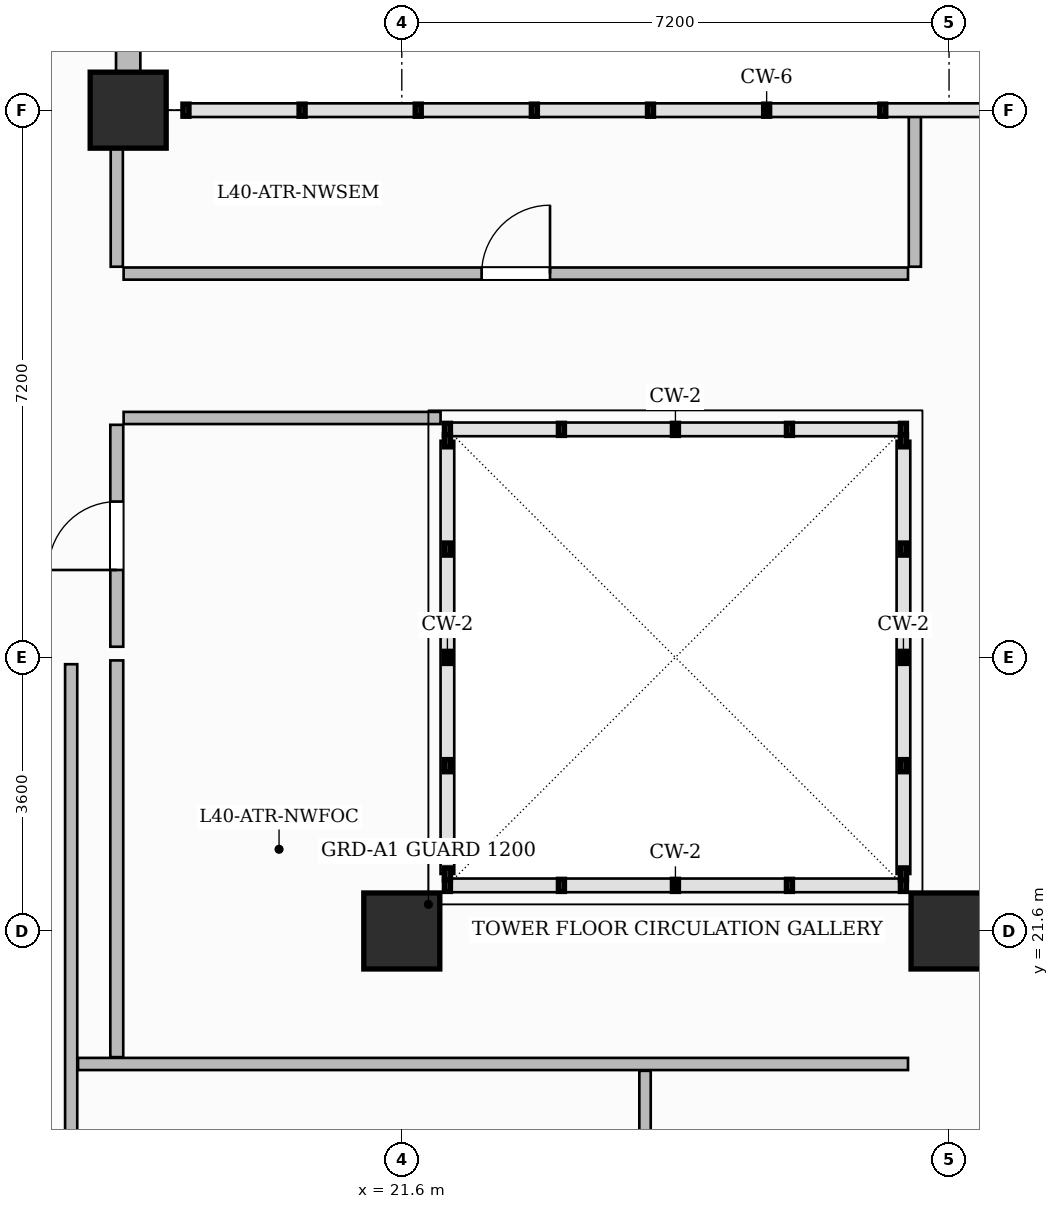
"""IFC4 building model, lengths in metres.
Left out: names, types, materials, properties, quantities, classifications, styles, units other than length and angle.
Written with IfcOpenShell. Run it as: python <this file> out.ifc"""

import sys

from ifc_helpers import new_model, si_unit, direction, frame, frame_2d, origin, origin_2d, place, context, subcontext, project, spatial, rectangle, extrude, source, transform, mapped, element, fill, save


model = new_model("IFC4")
c1 = context("Model", 3, precision=1e-05, world=origin(), true_north=direction((0.0, 1.0)))
c2 = subcontext(c1, "Body", "Model", "MODEL_VIEW")
j1 = project(units=[si_unit("LENGTHUNIT", "METRE"), si_unit("PLANEANGLEUNIT", "RADIAN")], contexts=[c1])
p1 = place(None, origin())
s1 = spatial("IfcSite", under=j1, at=p1, CompositionType="ELEMENT")
p2 = place(p1, origin())
s2 = spatial("IfcBuilding", under=s1, at=p2, CompositionType="ELEMENT")
p3 = place(p2, frame((0.0, 0.0, 161.85)))
s3 = spatial("IfcBuildingStorey", under=s2, at=p3, CompositionType="ELEMENT", Elevation=161.85)
m1 = source(origin(), c2, "Body", "SweptSolid", [
    extrude(rectangle(XDim=1.0, YDim=1.0, at=origin_2d()), origin(), (0.0, 0.0, 1.0), 3.85),
])
for number, where, z_axis, x_axis in (
    (1, (21.6, 21.6, 0.0), (0.0, 0.0, 1.0), (1.0, 0.0, 0.0)),
    (2, (28.8, 21.6, 0.0), (0.0, 0.0, 1.0), (1.0, 0.0, 0.0)),
    (3, (18.0, 32.4, 0.0), (0.0, 0.0, 1.0), (1.0, 0.0, 0.0)),
):
    element("IfcColumn", number, at=place(p3, frame(where, z_axis=z_axis, x_axis=x_axis)), inside=s3, PredefinedType="COLUMN", context=c2, shape_type="MappedRepresentation", body=[
        mapped(m1, transform((0.0, 0.0, 0.0), scale=1.0)),
    ])
p4 = place(p3, frame((17.25, 11.16, 0.0), z_axis=(0.0, 0.0, 1.0), x_axis=(0.0, 1.0, 0.0)))
e4 = element("IfcWall", 4, at=p4, inside=s3, PredefinedType="PARTITIONING", context=c2, shape_type="SweptSolid", body=[
    extrude(rectangle(XDim=13.95, YDim=0.16, at=frame_2d((6.975, 0.0))), origin(), (0.0, 0.0, 1.0), 3.6),
])
p5 = place(p3, frame((17.85, 19.94, 0.0), z_axis=(0.0, 0.0, 1.0), x_axis=(0.0, 1.0, 0.0)))
e5 = element("IfcWall", 5, at=p5, inside=s3, PredefinedType="PARTITIONING", context=c2, shape_type="SweptSolid", body=[
    extrude(rectangle(XDim=5.22, YDim=0.17, at=frame_2d((2.61, 0.0))), origin(), (0.0, 0.0, 1.0), 3.285),
])
p6 = place(p3, frame((17.85, 30.34, 0.0), z_axis=(0.0, 0.0, 1.0), x_axis=(0.0, 1.0, 0.0)))
e6 = element("IfcWall", 6, at=p6, inside=s3, PredefinedType="PARTITIONING", context=c2, shape_type="SweptSolid", body=[
    extrude(rectangle(XDim=1.87, YDim=0.16, at=frame_2d((0.935, 0.0))), origin(), (0.0, 0.0, 1.0), 3.6),
])
p7 = place(p3, frame((28.35, 30.34, 0.0), z_axis=(0.0, 0.0, 1.0), x_axis=(0.0, 1.0, 0.0)))
e7 = element("IfcWall", 7, at=p7, inside=s3, PredefinedType="PARTITIONING", context=c2, shape_type="SweptSolid", body=[
    extrude(rectangle(XDim=2.032, YDim=0.16, at=frame_2d((1.016, 0.0))), origin(), (0.0, 0.0, 1.0), 3.6),
])
p8 = place(p3, frame((17.94, 28.35, 0.0), z_axis=(0.0, 0.0, 1.0), x_axis=(1.0, 0.0, 0.0)))
e8 = element("IfcWall", 8, at=p8, inside=s3, PredefinedType="PARTITIONING", context=c2, shape_type="SweptSolid", body=[
    extrude(rectangle(XDim=4.17, YDim=0.16, at=frame_2d((2.085, 0.0))), origin(), (0.0, 0.0, 1.0), 3.6),
])
p9 = place(p3, frame((17.94, 30.25, 0.0), z_axis=(0.0, 0.0, 1.0), x_axis=(1.0, 0.0, 0.0)))
e9 = element("IfcWall", 9, at=p9, inside=s3, PredefinedType="PARTITIONING", context=c2, shape_type="SweptSolid", body=[
    extrude(rectangle(XDim=10.32, YDim=0.16, at=frame_2d((5.16, 0.0))), origin(), (0.0, 0.0, 1.0), 3.6),
])
p10 = place(p9, frame((4.71, 0.0, 0.0)))
e10 = element("IfcOpeningElement", 10, at=p10, cuts=e9, PredefinedType="OPENING", context=c2, shape_type="SweptSolid", body=[
    extrude(rectangle(XDim=0.9, YDim=2.15, at=frame_2d((0.45, 1.075))), frame((0.0, 0.09, 0.0), z_axis=(0.0, -1.0, 0.0), x_axis=(1.0, 0.0, 0.0)), (0.0, 0.0, 1.0), 0.18),
])
p11 = place(p3, frame((17.85, 25.34, 0.0), z_axis=(0.0, 0.0, 1.0), x_axis=(0.0, 1.0, 0.0)))
e11 = element("IfcWall", 11, at=p11, inside=s3, PredefinedType="PARTITIONING", context=c2, shape_type="SweptSolid", body=[
    extrude(rectangle(XDim=2.92, YDim=0.17, at=frame_2d((1.46, 0.0))), origin(), (0.0, 0.0, 1.0), 3.6),
])
p12 = place(p11, frame((1.01, 0.0, 0.0)))
e12 = element("IfcOpeningElement", 12, at=p12, cuts=e11, PredefinedType="OPENING", context=c2, shape_type="SweptSolid", body=[
    extrude(rectangle(XDim=0.9, YDim=2.15, at=frame_2d((0.45, 1.075))), frame((0.0, 0.095, 0.0), z_axis=(0.0, -1.0, 0.0), x_axis=(1.0, 0.0, 0.0)), (0.0, 0.0, 1.0), 0.19),
])
p13 = place(p3, frame((17.34, 19.85, 0.0), z_axis=(0.0, 0.0, 1.0), x_axis=(1.0, 0.0, 0.0)))
e13 = element("IfcWall", 13, at=p13, inside=s3, PredefinedType="PARTITIONING", context=c2, shape_type="SweptSolid", body=[
    extrude(rectangle(XDim=10.92, YDim=0.16, at=frame_2d((5.46, 0.0))), origin(), (0.0, 0.0, 1.0), 3.6),
])
p14 = place(p3, frame((24.8, 11.16, 0.0), z_axis=(0.0, 0.0, 1.0), x_axis=(0.0, 1.0, 0.0)))
e14 = element("IfcWall", 14, at=p14, inside=s3, PredefinedType="PARTITIONING", context=c2, shape_type="SweptSolid", body=[
    extrude(rectangle(XDim=8.6, YDim=0.15, at=frame_2d((4.3, 0.0))), origin(), (0.0, 0.0, 1.0), 3.6),
])
p15 = place(p14, frame((0.535, 0.0, 0.0)))
e15 = element("IfcOpeningElement", 15, at=p15, cuts=e14, PredefinedType="OPENING", context=c2, shape_type="SweptSolid", body=[
    extrude(rectangle(XDim=0.9, YDim=2.15, at=frame_2d((0.45, 1.075))), frame((0.0, 0.085, 0.0), z_axis=(0.0, -1.0, 0.0), x_axis=(1.0, 0.0, 0.0)), (0.0, 0.0, 1.0), 0.17),
])
p16 = place(p3, frame((18.0, 32.4, 0.0), z_axis=(0.0, 0.0, 1.0), x_axis=(0.0, 1.0, 0.0)))
e16 = element("IfcWall", 16, at=p16, inside=s3, PredefinedType="SOLIDWALL", context=c2, shape_type="SweptSolid", body=[
    extrude(rectangle(XDim=14.35, YDim=0.32, at=frame_2d((7.175, 0.0))), origin(), (0.0, 0.0, 1.0), 3.6),
])
p17 = place(p16, frame((0.85, 0.0, 0.0)))
e17 = element("IfcOpeningElement", 17, at=p17, cuts=e16, PredefinedType="OPENING", context=c2, shape_type="SweptSolid", body=[
    extrude(rectangle(XDim=1.2, YDim=2.2, at=frame_2d((0.6, 1.1))), frame((0.0, 0.17, 0.0), z_axis=(0.0, -1.0, 0.0), x_axis=(1.0, 0.0, 0.0)), (0.0, 0.0, 1.0), 0.34),
])
p18 = place(p16, frame((3.475, 0.0, 0.8)))
e18 = element("IfcOpeningElement", 18, at=p18, cuts=e16, PredefinedType="OPENING", context=c2, shape_type="SweptSolid", body=[
    extrude(rectangle(XDim=1.8, YDim=1.85, at=frame_2d((0.9, 0.925))), frame((0.0, 0.17, 0.0), z_axis=(0.0, -1.0, 0.0), x_axis=(1.0, 0.0, 0.0)), (0.0, 0.0, 1.0), 0.34),
])
p19 = place(p16, frame((8.525, 0.0, 0.8)))
e19 = element("IfcOpeningElement", 19, at=p19, cuts=e16, PredefinedType="OPENING", context=c2, shape_type="SweptSolid", body=[
    extrude(rectangle(XDim=1.8, YDim=1.85, at=frame_2d((0.9, 0.925))), frame((0.0, 0.17, 0.0), z_axis=(0.0, -1.0, 0.0), x_axis=(1.0, 0.0, 0.0)), (0.0, 0.0, 1.0), 0.34),
])
p20 = place(p16, frame((11.275, 0.0, 0.8)))
e20 = element("IfcOpeningElement", 20, at=p20, cuts=e16, PredefinedType="OPENING", context=c2, shape_type="SweptSolid", body=[
    extrude(rectangle(XDim=1.8, YDim=1.85, at=frame_2d((0.9, 0.925))), frame((0.0, 0.17, 0.0), z_axis=(0.0, -1.0, 0.0), x_axis=(1.0, 0.0, 0.0)), (0.0, 0.0, 1.0), 0.34),
])
m2 = source(origin(), c2, "Body", "SweptSolid", [
    extrude(rectangle(XDim=0.9, YDim=2.15, at=frame_2d((0.45, 1.075))), frame((0.0, 0.025, 0.0), z_axis=(0.0, -1.0, 0.0), x_axis=(1.0, 0.0, 0.0)), (0.0, 0.0, 1.0), 0.05),
])
p21 = place(p12, origin())
e21 = element("IfcDoor", 21, at=p21, inside=s3, OperationType="SINGLE_SWING_LEFT", PredefinedType="DOOR", context=c2, shape_type="MappedRepresentation", body=[
    mapped(m2, transform((0.0, 0.0, 0.0), scale=1.0)),
])
fill(e12, e21)
p22 = place(p10, origin())
e22 = element("IfcDoor", 22, at=p22, inside=s3, OperationType="SINGLE_SWING_RIGHT", PredefinedType="DOOR", context=c2, shape_type="MappedRepresentation", body=[
    mapped(m2, transform((0.0, 0.0, 0.0), scale=1.0)),
])
fill(e10, e22)
save(model, sys.argv[1])
